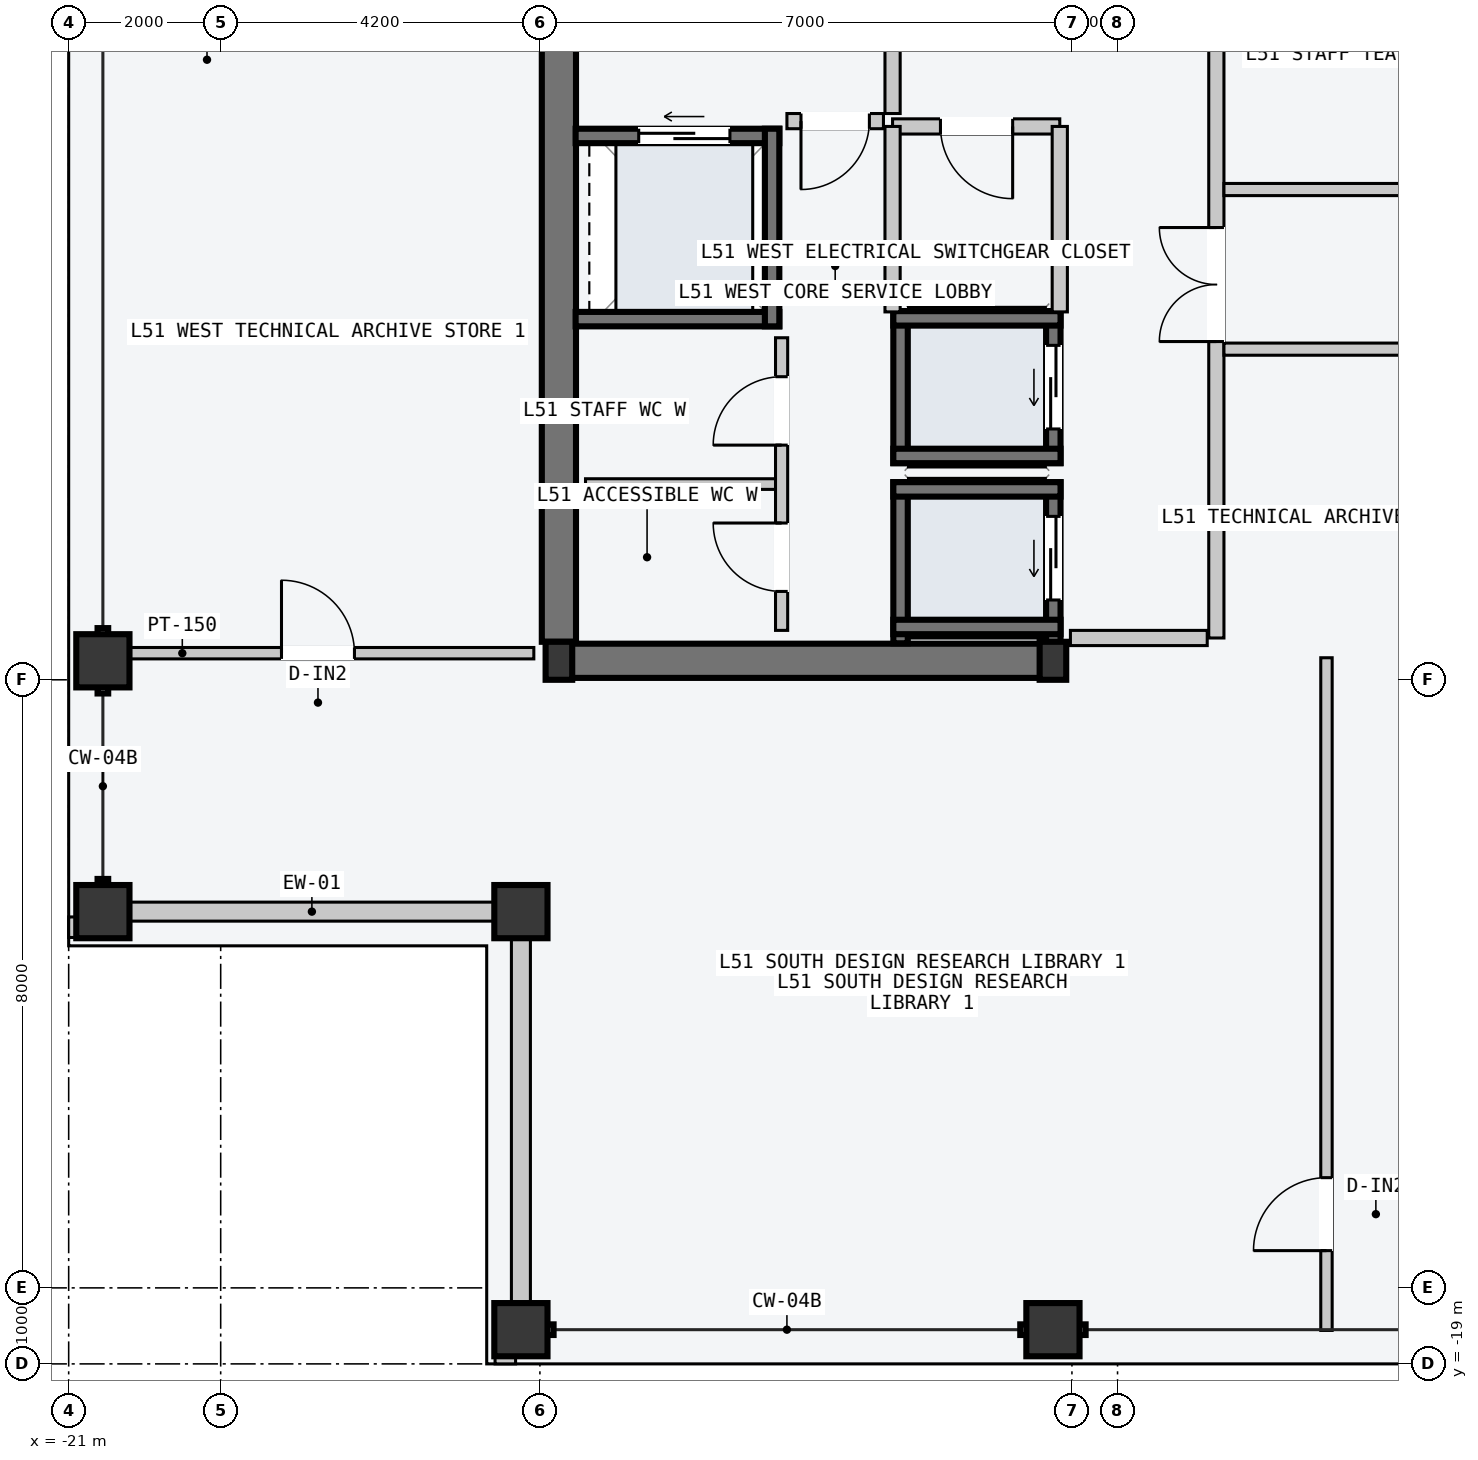
"""IFC4 building model, lengths in metres.
Left out: names, types, materials, properties, quantities, classifications, styles, units other than length and angle.
Written with IfcOpenShell. Run it as: python <this file> out.ifc"""

import sys

from ifc_helpers import new_model, si_unit, direction, frame, frame_2d, origin, origin_2d, place, context, subcontext, project, spatial, rectangle, hollow_rectangle, i_section, extrude, element, fill, save


model = new_model("IFC4")
c1 = context("Model", 3, precision=1e-05, world=origin(), true_north=direction((0.0, 1.0)))
c2 = subcontext(c1, "Body", "Model", "MODEL_VIEW")
j1 = project(units=[si_unit("LENGTHUNIT", "METRE"), si_unit("PLANEANGLEUNIT", "RADIAN")], contexts=[c1])
p1 = place(None, origin())
s1 = spatial("IfcSite", under=j1, at=p1, CompositionType="ELEMENT")
p2 = place(p1, origin())
s2 = spatial("IfcBuilding", under=s1, at=p2, CompositionType="ELEMENT")
p3 = place(p2, frame((0.0, 0.0, 194.7)))
s3 = spatial("IfcBuildingStorey", under=s2, at=p3, CompositionType="ELEMENT", Elevation=194.7)
p4 = place(p3, frame((-14.53, -9.75, -0.2), z_axis=(0.0, 0.0, 1.0), x_axis=(1.0, 0.0, 0.0)))
e1 = element("IfcWall", 1, at=p4, inside=s3, PredefinedType="SHEAR", context=c2, shape_type="SweptSolid", body=[
    extrude(rectangle(XDim=6.46, YDim=0.45, at=frame_2d((3.23, 0.0))), origin(), (0.0, 0.0, 1.0), 3.6),
])
p5 = place(p3, frame((-14.55, -9.5, -0.2), z_axis=(0.0, 0.0, 1.0), x_axis=(0.0, 1.0, 0.0)))
e2 = element("IfcWall", 2, at=p5, inside=s3, PredefinedType="SHEAR", context=c2, shape_type="SweptSolid", body=[
    extrude(rectangle(XDim=9.25, YDim=0.45, at=frame_2d((4.625, 0.0))), origin(), (0.0, 0.0, 1.0), 3.6),
])
for number, where, z_axis, x_axis in (
    (3, (-14.55, -9.75, 0.0), (0.0, 0.0, 1.0), (1.0, 0.0, 0.0)),
    (4, (-8.05, -9.75, 0.0), (0.0, 0.0, 1.0), (1.0, 0.0, 0.0)),
):
    element("IfcColumn", number, at=place(p3, frame(where, z_axis=z_axis, x_axis=x_axis)), inside=s3, PredefinedType="COLUMN", context=c2, shape_type="SweptSolid", body=[
        extrude(i_section(OverallWidth=0.35, OverallDepth=0.5, WebThickness=0.02, FlangeThickness=0.032, at=origin_2d()), origin(), (0.0, 0.0, 1.0), 3.6),
    ])
for number, where, z_axis, x_axis in (
    (5, (-15.05, -18.55, 0.0), (0.0, 0.0, 1.0), (1.0, 0.0, 0.0)),
    (6, (-8.05, -18.55, 0.0), (0.0, 0.0, 1.0), (1.0, 0.0, 0.0)),
    (7, (-20.55, -13.05, 0.0), (0.0, 0.0, 1.0), (0.0, 1.0, 0.0)),
    (8, (-20.55, -9.75, 0.0), (0.0, 0.0, 1.0), (0.0, 1.0, 0.0)),
    (9, (-15.05, -13.05, 0.0), (0.0, 0.0, 1.0), (1.0, 0.0, 0.0)),
):
    element("IfcColumn", number, at=place(p3, frame(where, z_axis=z_axis, x_axis=x_axis)), inside=s3, PredefinedType="COLUMN", context=c2, shape_type="SweptSolid", body=[
        extrude(hollow_rectangle(XDim=0.7, YDim=0.7, WallThickness=0.03, at=origin_2d()), origin(), (0.0, 0.0, 1.0), 3.6),
    ])
for number, where, z_axis, x_axis in (
    (10, (-20.19, -13.05, 0.0), (0.0, 0.0, 1.0), (1.0, 0.0, 0.0)),
    (11, (-15.05, -18.19, 0.0), (0.0, 0.0, 1.0), (0.0, 1.0, 0.0)),
):
    element("IfcWall", number, at=place(p3, frame(where, z_axis=z_axis, x_axis=x_axis)), inside=s3, PredefinedType="STANDARD", context=c2, shape_type="SweptSolid", body=[
        extrude(rectangle(XDim=4.78, YDim=0.25, at=frame_2d((2.39, 0.0))), origin(), (0.0, 0.0, 1.0), 2.75),
    ])
for number, where, z_axis, x_axis in (
    (12, (-15.39, -18.89, 0.0), (0.0, 0.0, 1.0), (1.0, 0.0, 0.0)),
    (13, (-20.89, -13.39, 0.0), (0.0, 0.0, 1.0), (0.0, 1.0, 0.0)),
):
    element("IfcWall", number, at=place(p3, frame(where, z_axis=z_axis, x_axis=x_axis)), inside=s3, PredefinedType="PARAPET", context=c2, shape_type="SweptSolid", body=[
        extrude(rectangle(XDim=0.27, YDim=0.22, at=frame_2d((0.135, 0.0))), origin(), (0.0, 0.0, 1.0), 1.2),
    ])
p6 = place(p3, frame((-8.045, -9.52, -0.2), z_axis=(0.0, 0.0, 1.0), x_axis=(0.0, 1.0, 0.0)))
e14 = element("IfcWall", 14, at=p6, inside=s3, PredefinedType="SOLIDWALL", context=c2, shape_type="SweptSolid", body=[
    extrude(rectangle(XDim=2.12, YDim=0.19, at=frame_2d((1.06, 0.0))), origin(), (0.0, 0.0, 1.0), 3.6),
])
p7 = place(p6, frame((0.57, 0.0, 0.2)))
e15 = element("IfcOpeningElement", 15, at=p7, cuts=e14, PredefinedType="OPENING", context=c2, shape_type="SweptSolid", body=[
    extrude(rectangle(XDim=1.1, YDim=2.2, at=frame_2d((0.55, 1.1))), frame((0.0, 0.105, 0.0), z_axis=(0.0, -1.0, 0.0), x_axis=(1.0, 0.0, 0.0)), (0.0, 0.0, 1.0), 0.21),
])
p8 = place(p3, frame((-10.055, -9.52, -0.2), z_axis=(0.0, 0.0, 1.0), x_axis=(0.0, 1.0, 0.0)))
e16 = element("IfcWall", 16, at=p8, inside=s3, PredefinedType="SOLIDWALL", context=c2, shape_type="SweptSolid", body=[
    extrude(rectangle(XDim=2.12, YDim=0.19, at=frame_2d((1.06, 0.0))), origin(), (0.0, 0.0, 1.0), 3.6),
])
for number, where, z_axis, x_axis in (
    (17, (-10.15, -7.495, -0.2), (0.0, 0.0, 1.0), (1.0, 0.0, 0.0)),
    (18, (-10.15, -9.305, -0.2), (0.0, 0.0, 1.0), (1.0, 0.0, 0.0)),
):
    element("IfcWall", number, at=place(p3, frame(where, z_axis=z_axis, x_axis=x_axis)), inside=s3, PredefinedType="SOLIDWALL", context=c2, shape_type="SweptSolid", body=[
        extrude(rectangle(XDim=2.2, YDim=0.19, at=frame_2d((1.1, 0.0))), origin(), (0.0, 0.0, 1.0), 3.6),
    ])
p9 = place(p3, frame((-8.045, -7.15, -0.2), z_axis=(0.0, 0.0, 1.0), x_axis=(0.0, 1.0, 0.0)))
e19 = element("IfcWall", 19, at=p9, inside=s3, PredefinedType="SOLIDWALL", context=c2, shape_type="SweptSolid", body=[
    extrude(rectangle(XDim=2.0, YDim=0.19, at=frame_2d((1.0, 0.0))), origin(), (0.0, 0.0, 1.0), 3.6),
])
p10 = place(p9, frame((0.45, 0.0, 0.2)))
e20 = element("IfcOpeningElement", 20, at=p10, cuts=e19, PredefinedType="OPENING", context=c2, shape_type="SweptSolid", body=[
    extrude(rectangle(XDim=1.1, YDim=2.2, at=frame_2d((0.55, 1.1))), frame((0.0, 0.105, 0.0), z_axis=(0.0, -1.0, 0.0), x_axis=(1.0, 0.0, 0.0)), (0.0, 0.0, 1.0), 0.21),
])
p11 = place(p3, frame((-10.055, -7.15, -0.2), z_axis=(0.0, 0.0, 1.0), x_axis=(0.0, 1.0, 0.0)))
e21 = element("IfcWall", 21, at=p11, inside=s3, PredefinedType="SOLIDWALL", context=c2, shape_type="SweptSolid", body=[
    extrude(rectangle(XDim=2.0, YDim=0.19, at=frame_2d((1.0, 0.0))), origin(), (0.0, 0.0, 1.0), 3.6),
])
for number, where, z_axis, x_axis in (
    (22, (-10.15, -5.245, -0.2), (0.0, 0.0, 1.0), (1.0, 0.0, 0.0)),
    (23, (-10.15, -7.055, -0.2), (0.0, 0.0, 1.0), (1.0, 0.0, 0.0)),
):
    element("IfcWall", number, at=place(p3, frame(where, z_axis=z_axis, x_axis=x_axis)), inside=s3, PredefinedType="SOLIDWALL", context=c2, shape_type="SweptSolid", body=[
        extrude(rectangle(XDim=2.2, YDim=0.19, at=frame_2d((1.1, 0.0))), origin(), (0.0, 0.0, 1.0), 3.6),
    ])
p12 = place(p3, frame((-14.33, -2.845, -0.2), z_axis=(0.0, 0.0, 1.0), x_axis=(1.0, 0.0, 0.0)))
e24 = element("IfcWall", 24, at=p12, inside=s3, PredefinedType="SOLIDWALL", context=c2, shape_type="SweptSolid", body=[
    extrude(rectangle(XDim=2.68, YDim=0.19, at=frame_2d((1.34, 0.0))), origin(), (0.0, 0.0, 1.0), 3.6),
])
p13 = place(p12, frame((0.83, 0.0, 0.2)))
e25 = element("IfcOpeningElement", 25, at=p13, cuts=e24, PredefinedType="OPENING", context=c2, shape_type="SweptSolid", body=[
    extrude(rectangle(XDim=1.2, YDim=2.2, at=frame_2d((0.6, 1.1))), frame((0.0, 0.105, 0.0), z_axis=(0.0, -1.0, 0.0), x_axis=(1.0, 0.0, 0.0)), (0.0, 0.0, 1.0), 0.21),
])
p14 = place(p3, frame((-14.33, -5.255, -0.2), z_axis=(0.0, 0.0, 1.0), x_axis=(1.0, 0.0, 0.0)))
e26 = element("IfcWall", 26, at=p14, inside=s3, PredefinedType="SOLIDWALL", context=c2, shape_type="SweptSolid", body=[
    extrude(rectangle(XDim=2.68, YDim=0.19, at=frame_2d((1.34, 0.0))), origin(), (0.0, 0.0, 1.0), 3.6),
])
p15 = place(p3, frame((-11.745, -5.35, -0.2), z_axis=(0.0, 0.0, 1.0), x_axis=(0.0, 1.0, 0.0)))
e27 = element("IfcWall", 27, at=p15, inside=s3, PredefinedType="SOLIDWALL", context=c2, shape_type="SweptSolid", body=[
    extrude(rectangle(XDim=2.6, YDim=0.19, at=frame_2d((1.3, 0.0))), origin(), (0.0, 0.0, 1.0), 3.6),
])
p16 = place(p3, frame((-5.9, -9.45, 0.0), z_axis=(0.0, 0.0, 1.0), x_axis=(0.0, 1.0, 0.0)))
e28 = element("IfcWall", 28, at=p16, inside=s3, PredefinedType="PARTITIONING", context=c2, shape_type="SweptSolid", body=[
    extrude(rectangle(XDim=10.5, YDim=0.2, at=frame_2d((5.25, 0.0))), origin(), (0.0, 0.0, 1.0), 3.4),
])
p17 = place(p16, frame((3.9, 0.0, 0.0)))
e29 = element("IfcOpeningElement", 29, at=p17, cuts=e28, PredefinedType="OPENING", context=c2, shape_type="SweptSolid", body=[
    extrude(rectangle(XDim=1.5, YDim=2.2, at=frame_2d((0.75, 1.1))), frame((0.0, 0.11, 0.0), z_axis=(0.0, -1.0, 0.0), x_axis=(1.0, 0.0, 0.0)), (0.0, 0.0, 1.0), 0.22),
])
p18 = place(p3, frame((-6.02, -9.45, 0.0), z_axis=(0.0, 0.0, 1.0), x_axis=(-1.0, 0.0, 0.0)))
e30 = element("IfcWall", 30, at=p18, inside=s3, PredefinedType="PARTITIONING", context=c2, shape_type="SweptSolid", body=[
    extrude(rectangle(XDim=1.8, YDim=0.2, at=frame_2d((0.9, 0.0))), origin(), (0.0, 0.0, 1.0), 3.4),
])
p19 = place(p3, frame((-10.16, -2.55, 0.0), z_axis=(0.0, 0.0, 1.0), x_axis=(0.0, 1.0, 0.0)))
e31 = element("IfcWall", 31, at=p19, inside=s3, PredefinedType="PARTITIONING", context=c2, shape_type="SweptSolid", body=[
    extrude(rectangle(XDim=3.8, YDim=0.2, at=frame_2d((1.9, 0.0))), origin(), (0.0, 0.0, 1.0), 3.4),
])
p20 = place(p19, frame((1.3, 0.0, 0.0)))
e32 = element("IfcOpeningElement", 32, at=p20, cuts=e31, PredefinedType="OPENING", context=c2, shape_type="SweptSolid", body=[
    extrude(rectangle(XDim=1.1, YDim=2.15, at=frame_2d((0.55, 1.075))), frame((0.0, 0.11, 0.0), z_axis=(0.0, -1.0, 0.0), x_axis=(1.0, 0.0, 0.0)), (0.0, 0.0, 1.0), 0.22),
])
p21 = place(p3, frame((-10.28, -2.65, 0.0), z_axis=(0.0, 0.0, 1.0), x_axis=(-1.0, 0.0, 0.0)))
e33 = element("IfcWall", 33, at=p21, inside=s3, PredefinedType="PARTITIONING", context=c2, shape_type="SweptSolid", body=[
    extrude(rectangle(XDim=1.27, YDim=0.2, at=frame_2d((0.635, 0.0))), origin(), (0.0, 0.0, 1.0), 3.4),
])
p22 = place(p21, frame((0.185, 0.0, 0.0)))
e34 = element("IfcOpeningElement", 34, at=p22, cuts=e33, PredefinedType="OPENING", context=c2, shape_type="SweptSolid", body=[
    extrude(rectangle(XDim=0.9, YDim=2.15, at=frame_2d((0.45, 1.075))), frame((0.0, 0.11, 0.0), z_axis=(0.0, -1.0, 0.0), x_axis=(1.0, 0.0, 0.0)), (0.0, 0.0, 1.0), 0.22),
])
p23 = place(p3, frame((-7.96, -2.72, 0.0), z_axis=(0.0, 0.0, 1.0), x_axis=(-1.0, 0.0, 0.0)))
e35 = element("IfcWall", 35, at=p23, inside=s3, PredefinedType="PARTITIONING", context=c2, shape_type="SweptSolid", body=[
    extrude(rectangle(XDim=2.2, YDim=0.2, at=frame_2d((1.1, 0.0))), origin(), (0.0, 0.0, 1.0), 3.4),
])
p24 = place(p23, frame((0.62, 0.0, 0.0)))
e36 = element("IfcOpeningElement", 36, at=p24, cuts=e35, PredefinedType="OPENING", context=c2, shape_type="SweptSolid", body=[
    extrude(rectangle(XDim=0.95, YDim=2.1, at=frame_2d((0.475, 1.05))), frame((0.0, 0.11, 0.0), z_axis=(0.0, -1.0, 0.0), x_axis=(1.0, 0.0, 0.0)), (0.0, 0.0, 1.0), 0.22),
])
for number, where, z_axis, x_axis in (
    (37, (-7.96, -5.16, 0.0), (0.0, 0.0, 1.0), (0.0, 1.0, 0.0)),
    (38, (-10.16, -5.16, 0.0), (0.0, 0.0, 1.0), (0.0, 1.0, 0.0)),
):
    element("IfcWall", number, at=place(p3, frame(where, z_axis=z_axis, x_axis=x_axis)), inside=s3, PredefinedType="PARTITIONING", context=c2, shape_type="SweptSolid", body=[
        extrude(rectangle(XDim=2.44, YDim=0.2, at=frame_2d((1.22, 0.0))), origin(), (0.0, 0.0, 1.0), 3.4),
    ])
p25 = place(p3, frame((-11.7, -7.425, 0.0), z_axis=(0.0, 0.0, 1.0), x_axis=(-1.0, 0.0, 0.0)))
e39 = element("IfcWall", 39, at=p25, inside=s3, PredefinedType="PARTITIONING", context=c2, shape_type="SweptSolid", body=[
    extrude(rectangle(XDim=2.5, YDim=0.14, at=frame_2d((1.25, 0.0))), origin(), (0.0, 0.0, 1.0), 3.4),
])
p26 = place(p3, frame((-11.62, -9.35, 0.0), z_axis=(0.0, 0.0, 1.0), x_axis=(0.0, 1.0, 0.0)))
e40 = element("IfcWall", 40, at=p26, inside=s3, PredefinedType="PARTITIONING", context=c2, shape_type="SweptSolid", body=[
    extrude(rectangle(XDim=3.85, YDim=0.16, at=frame_2d((1.925, 0.0))), origin(), (0.0, 0.0, 1.0), 3.4),
])
p27 = place(p26, frame((0.512, 0.0, 0.0)))
e41 = element("IfcOpeningElement", 41, at=p27, cuts=e40, PredefinedType="OPENING", context=c2, shape_type="SweptSolid", body=[
    extrude(rectangle(XDim=0.9, YDim=2.15, at=frame_2d((0.45, 1.075))), frame((0.0, 0.09, 0.0), z_axis=(0.0, -1.0, 0.0), x_axis=(1.0, 0.0, 0.0)), (0.0, 0.0, 1.0), 0.18),
])
p28 = place(p26, frame((2.438, 0.0, 0.0)))
e42 = element("IfcOpeningElement", 42, at=p28, cuts=e40, PredefinedType="OPENING", context=c2, shape_type="SweptSolid", body=[
    extrude(rectangle(XDim=0.9, YDim=2.15, at=frame_2d((0.45, 1.075))), frame((0.0, 0.09, 0.0), z_axis=(0.0, -1.0, 0.0), x_axis=(1.0, 0.0, 0.0)), (0.0, 0.0, 1.0), 0.18),
])
for number, where, z_axis, x_axis in (
    (43, (-5.8, -3.55, 0.0), (0.0, 0.0, 1.0), (1.0, 0.0, 0.0)),
    (44, (-5.8, -5.65, 0.0), (0.0, 0.0, 1.0), (1.0, 0.0, 0.0)),
):
    element("IfcWall", number, at=place(p3, frame(where, z_axis=z_axis, x_axis=x_axis)), inside=s3, PredefinedType="PARTITIONING", context=c2, shape_type="SweptSolid", body=[
        extrude(rectangle(XDim=4.54, YDim=0.16, at=frame_2d((2.27, 0.0))), origin(), (0.0, 0.0, 1.0), 3.4),
    ])
p29 = place(p3, frame((-4.451, -18.56, 0.0), z_axis=(0.0, 0.0, 1.0), x_axis=(0.0, 1.0, 0.0)))
e45 = element("IfcWall", 45, at=p29, inside=s3, PredefinedType="PARTITIONING", context=c2, shape_type="SweptSolid", body=[
    extrude(rectangle(XDim=8.85, YDim=0.15, at=frame_2d((4.425, 0.0))), origin(), (0.0, 0.0, 1.0), 3.4),
])
p30 = place(p29, frame((1.05, 0.0, 0.0)))
e46 = element("IfcOpeningElement", 46, at=p30, cuts=e45, PredefinedType="OPENING", context=c2, shape_type="SweptSolid", body=[
    extrude(rectangle(XDim=0.96, YDim=2.18, at=frame_2d((0.48, 1.09))), frame((0.0, 0.085, 0.0), z_axis=(0.0, -1.0, 0.0), x_axis=(1.0, 0.0, 0.0)), (0.0, 0.0, 1.0), 0.17),
])
p31 = place(p3, frame((-20.56, -9.65, 0.0), z_axis=(0.0, 0.0, 1.0), x_axis=(1.0, 0.0, 0.0)))
e47 = element("IfcWall", 47, at=p31, inside=s3, PredefinedType="PARTITIONING", context=c2, shape_type="SweptSolid", body=[
    extrude(rectangle(XDim=5.68, YDim=0.15, at=frame_2d((2.84, 0.0))), origin(), (0.0, 0.0, 1.0), 2.75),
])
p32 = place(p31, frame((2.36, 0.0, 0.0)))
e48 = element("IfcOpeningElement", 48, at=p32, cuts=e47, PredefinedType="OPENING", context=c2, shape_type="SweptSolid", body=[
    extrude(rectangle(XDim=0.96, YDim=2.18, at=frame_2d((0.48, 1.09))), frame((0.0, 0.085, 0.0), z_axis=(0.0, -1.0, 0.0), x_axis=(1.0, 0.0, 0.0)), (0.0, 0.0, 1.0), 0.17),
])
p33 = place(p7, origin())
e49 = element("IfcDoor", 49, at=p33, inside=s3, OperationType="SLIDING_TO_LEFT", PredefinedType="DOOR", context=c2, shape_type="SweptSolid", body=[
    extrude(rectangle(XDim=1.1, YDim=2.2, at=frame_2d((0.55, 1.1))), frame((0.0, 0.025, 0.0), z_axis=(0.0, -1.0, 0.0), x_axis=(1.0, 0.0, 0.0)), (0.0, 0.0, 1.0), 0.05),
])
fill(e15, e49)
p34 = place(p10, origin())
e50 = element("IfcDoor", 50, at=p34, inside=s3, OperationType="SLIDING_TO_LEFT", PredefinedType="DOOR", context=c2, shape_type="SweptSolid", body=[
    extrude(rectangle(XDim=1.1, YDim=2.2, at=frame_2d((0.55, 1.1))), frame((0.0, 0.025, 0.0), z_axis=(0.0, -1.0, 0.0), x_axis=(1.0, 0.0, 0.0)), (0.0, 0.0, 1.0), 0.05),
])
fill(e20, e50)
p35 = place(p13, origin())
e51 = element("IfcDoor", 51, at=p35, inside=s3, OperationType="SLIDING_TO_LEFT", PredefinedType="DOOR", context=c2, shape_type="SweptSolid", body=[
    extrude(rectangle(XDim=1.2, YDim=2.2, at=frame_2d((0.6, 1.1))), frame((0.0, 0.025, 0.0), z_axis=(0.0, -1.0, 0.0), x_axis=(1.0, 0.0, 0.0)), (0.0, 0.0, 1.0), 0.05),
])
fill(e25, e51)
p36 = place(p17, origin())
e52 = element("IfcDoor", 52, at=p36, inside=s3, OperationType="DOUBLE_DOOR_SINGLE_SWING", PredefinedType="DOOR", context=c2, shape_type="SweptSolid", body=[
    extrude(rectangle(XDim=1.5, YDim=2.2, at=frame_2d((0.75, 1.1))), frame((0.0, 0.025, 0.0), z_axis=(0.0, -1.0, 0.0), x_axis=(1.0, 0.0, 0.0)), (0.0, 0.0, 1.0), 0.05),
])
fill(e29, e52)
p37 = place(p22, origin())
e53 = element("IfcDoor", 53, at=p37, inside=s3, OperationType="SINGLE_SWING_RIGHT", PredefinedType="DOOR", context=c2, shape_type="SweptSolid", body=[
    extrude(rectangle(XDim=0.9, YDim=2.15, at=frame_2d((0.45, 1.075))), frame((0.0, 0.025, 0.0), z_axis=(0.0, -1.0, 0.0), x_axis=(1.0, 0.0, 0.0)), (0.0, 0.0, 1.0), 0.05),
])
fill(e34, e53)
p38 = place(p24, origin())
e54 = element("IfcDoor", 54, at=p38, inside=s3, OperationType="SINGLE_SWING_LEFT", PredefinedType="DOOR", context=c2, shape_type="SweptSolid", body=[
    extrude(rectangle(XDim=0.95, YDim=2.1, at=frame_2d((0.475, 1.05))), frame((0.0, 0.025, 0.0), z_axis=(0.0, -1.0, 0.0), x_axis=(1.0, 0.0, 0.0)), (0.0, 0.0, 1.0), 0.05),
])
fill(e36, e54)
p39 = place(p27, origin())
e55 = element("IfcDoor", 55, at=p39, inside=s3, OperationType="SINGLE_SWING_RIGHT", PredefinedType="DOOR", context=c2, shape_type="SweptSolid", body=[
    extrude(rectangle(XDim=0.9, YDim=2.15, at=frame_2d((0.45, 1.075))), frame((0.0, 0.025, 0.0), z_axis=(0.0, -1.0, 0.0), x_axis=(1.0, 0.0, 0.0)), (0.0, 0.0, 1.0), 0.05),
])
fill(e41, e55)
p40 = place(p28, origin())
e56 = element("IfcDoor", 56, at=p40, inside=s3, OperationType="SINGLE_SWING_LEFT", PredefinedType="DOOR", context=c2, shape_type="SweptSolid", body=[
    extrude(rectangle(XDim=0.9, YDim=2.15, at=frame_2d((0.45, 1.075))), frame((0.0, 0.025, 0.0), z_axis=(0.0, -1.0, 0.0), x_axis=(1.0, 0.0, 0.0)), (0.0, 0.0, 1.0), 0.05),
])
fill(e42, e56)
p41 = place(p30, origin())
e57 = element("IfcDoor", 57, at=p41, inside=s3, OperationType="SINGLE_SWING_LEFT", PredefinedType="DOOR", context=c2, shape_type="SweptSolid", body=[
    extrude(rectangle(XDim=0.96, YDim=2.18, at=frame_2d((0.48, 1.09))), frame((0.0, 0.025, 0.0), z_axis=(0.0, -1.0, 0.0), x_axis=(1.0, 0.0, 0.0)), (0.0, 0.0, 1.0), 0.05),
])
fill(e46, e57)
p42 = place(p32, origin())
e58 = element("IfcDoor", 58, at=p42, inside=s3, OperationType="SINGLE_SWING_LEFT", PredefinedType="DOOR", context=c2, shape_type="SweptSolid", body=[
    extrude(rectangle(XDim=0.96, YDim=2.18, at=frame_2d((0.48, 1.09))), frame((0.0, 0.025, 0.0), z_axis=(0.0, -1.0, 0.0), x_axis=(1.0, 0.0, 0.0)), (0.0, 0.0, 1.0), 0.05),
])
fill(e48, e58)
save(model, sys.argv[1])
